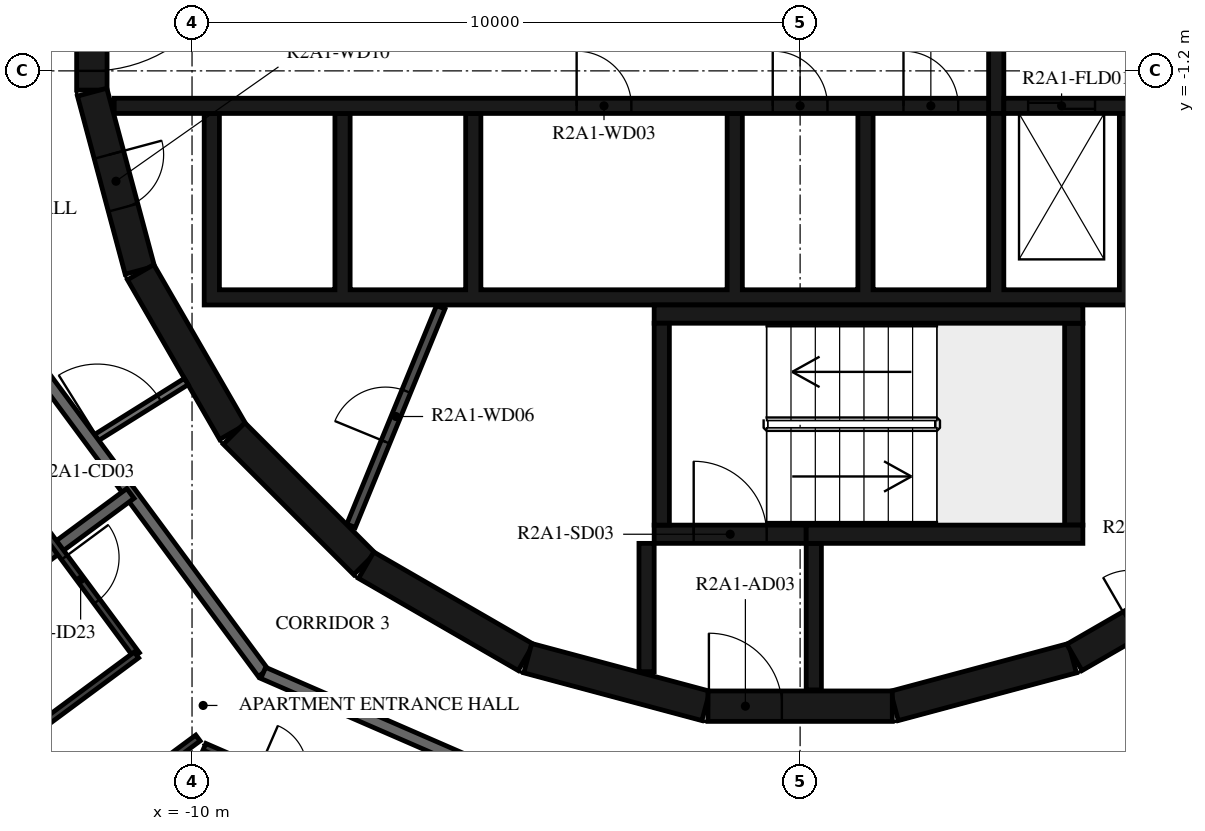
"""IFC4 building model, lengths in metres.
Left out: names, types, materials, properties, quantities, classifications, styles, units other than length and angle.
Written with IfcOpenShell. Run it as: python <this file> out.ifc"""

import sys

from ifc_helpers import new_model, si_unit, direction, frame, frame_2d, origin, place, context, subcontext, project, spatial, polyline, rectangle, outline, extrude, element, fill, save


model = new_model("IFC4")
c1 = context("Model", 3, precision=1e-05, world=origin(), true_north=direction((0.0, 1.0)))
c2 = subcontext(c1, "Body", "Model", "MODEL_VIEW")
j1 = project(units=[si_unit("LENGTHUNIT", "METRE"), si_unit("PLANEANGLEUNIT", "RADIAN")], contexts=[c1])
p1 = place(None, origin())
s1 = spatial("IfcSite", under=j1, at=p1, CompositionType="ELEMENT")
p2 = place(p1, origin())
s2 = spatial("IfcBuilding", under=s1, at=p2, CompositionType="ELEMENT")
p3 = place(p2, frame((0.0, 0.0, 80.2)))
s3 = spatial("IfcBuildingStorey", under=s2, at=p3, CompositionType="ELEMENT", Elevation=80.2)
p4 = place(p3, frame((1.55, -11.643, 0.0), z_axis=(0.0, 0.0, 1.0), x_axis=(0.965948410781, 0.258734743916, 0.0)))
e1 = element("IfcWall", 1, at=p4, inside=s3, PredefinedType="SHEAR", context=c2, shape_type="SweptSolid", body=[
    extrude(rectangle(XDim=3.033, YDim=0.5, at=frame_2d((1.516, 0.0))), origin(), (0.0, 0.0, 1.0), 3.12),
])
p5 = place(p3, frame((4.51, -10.845, 0.0), z_axis=(0.0, 0.0, 1.0), x_axis=(0.865975092491, 0.500087131594, 0.0)))
e2 = element("IfcWall", 2, at=p5, inside=s3, PredefinedType="SHEAR", context=c2, shape_type="SweptSolid", body=[
    extrude(rectangle(XDim=3.033, YDim=0.5, at=frame_2d((1.516, 0.0))), origin(), (0.0, 0.0, 1.0), 3.12),
])
p6 = place(p5, frame((1.066, 0.0, 0.0)))
e3 = element("IfcOpeningElement", 3, at=p6, cuts=e2, PredefinedType="OPENING", context=c2, shape_type="SweptSolid", body=[
    extrude(rectangle(XDim=0.9, YDim=2.1, at=frame_2d((0.45, 1.05))), frame((0.0, 0.26, 0.0), z_axis=(0.0, -1.0, 0.0), x_axis=(1.0, 0.0, 0.0)), (0.0, 0.0, 1.0), 0.52),
])
p7 = place(p3, frame((-11.647, 1.516, 0.0), z_axis=(0.0, 0.0, 1.0), x_axis=(0.0, -1.0, 0.0)))
e4 = element("IfcWall", 4, at=p7, inside=s3, PredefinedType="SHEAR", context=c2, shape_type="SweptSolid", body=[
    extrude(rectangle(XDim=3.033, YDim=0.5, at=frame_2d((1.516, 0.0))), origin(), (0.0, 0.0, 1.0), 3.12),
])
p8 = place(p7, frame((0.316, 0.0, 0.0)))
e5 = element("IfcOpeningElement", 5, at=p8, cuts=e4, PredefinedType="OPENING", context=c2, shape_type="SweptSolid", body=[
    extrude(rectangle(XDim=2.4, YDim=2.1, at=frame_2d((1.2, 1.05))), frame((0.0, 0.26, 0.0), z_axis=(0.0, -1.0, 0.0), x_axis=(1.0, 0.0, 0.0)), (0.0, 0.0, 1.0), 0.52),
])
p9 = place(p3, frame((-11.643, -1.55, 0.0), z_axis=(0.0, 0.0, 1.0), x_axis=(0.258734743916, -0.965948410781, 0.0)))
e6 = element("IfcWall", 6, at=p9, inside=s3, PredefinedType="SHEAR", context=c2, shape_type="SweptSolid", body=[
    extrude(rectangle(XDim=3.033, YDim=0.5, at=frame_2d((1.516, 0.0))), origin(), (0.0, 0.0, 1.0), 3.12),
])
p10 = place(p9, frame((1.066, 0.0, 0.0)))
e7 = element("IfcOpeningElement", 7, at=p10, cuts=e6, PredefinedType="OPENING", context=c2, shape_type="SweptSolid", body=[
    extrude(rectangle(XDim=0.9, YDim=2.1, at=frame_2d((0.45, 1.05))), frame((0.0, 0.26, 0.0), z_axis=(0.0, -1.0, 0.0), x_axis=(1.0, 0.0, 0.0)), (0.0, 0.0, 1.0), 0.52),
])
p11 = place(p3, frame((-10.845, -4.51, 0.0), z_axis=(0.0, 0.0, 1.0), x_axis=(0.500087131594, -0.865975092491, 0.0)))
e8 = element("IfcWall", 8, at=p11, inside=s3, PredefinedType="SHEAR", context=c2, shape_type="SweptSolid", body=[
    extrude(rectangle(XDim=3.033, YDim=0.5, at=frame_2d((1.516, 0.0))), origin(), (0.0, 0.0, 1.0), 3.12),
])
p12 = place(p3, frame((-9.308, -7.164, 0.0), z_axis=(0.0, 0.0, 1.0), x_axis=(0.707106781187, -0.707106781187, 0.0)))
e9 = element("IfcWall", 9, at=p12, inside=s3, PredefinedType="SHEAR", context=c2, shape_type="SweptSolid", body=[
    extrude(rectangle(XDim=3.032, YDim=0.5, at=frame_2d((1.516, 0.0))), origin(), (0.0, 0.0, 1.0), 3.12),
])
for number, where, z_axis, x_axis in (
    (10, (-7.137, -9.329, 0.0), (0.0, 0.0, 1.0), (0.866, -0.5, 0.0)),
    (11, (-4.479, -10.858, 0.0), (0.0, 0.0, 1.0), (0.966, -0.259, 0.0)),
):
    element("IfcWall", number, at=place(p3, frame(where, z_axis=z_axis, x_axis=x_axis)), inside=s3, PredefinedType="SHEAR", context=c2, shape_type="SweptSolid", body=[
        extrude(rectangle(XDim=3.033, YDim=0.5, at=frame_2d((1.516, 0.0))), origin(), (0.0, 0.0, 1.0), 3.12),
    ])
p13 = place(p3, frame((-1.516, -11.647, 0.0), z_axis=(0.0, 0.0, 1.0), x_axis=(1.0, 0.0, 0.0)))
e12 = element("IfcWall", 12, at=p13, inside=s3, PredefinedType="SHEAR", context=c2, shape_type="SweptSolid", body=[
    extrude(rectangle(XDim=3.033, YDim=0.5, at=frame_2d((1.516, 0.0))), origin(), (0.0, 0.0, 1.0), 3.12),
])
p14 = place(p13, frame((0.016, 0.0, 0.0)))
e13 = element("IfcOpeningElement", 13, at=p14, cuts=e12, PredefinedType="OPENING", context=c2, shape_type="SweptSolid", body=[
    extrude(rectangle(XDim=1.2, YDim=2.1, at=frame_2d((0.6, 1.05))), frame((0.0, 0.26, 0.0), z_axis=(0.0, -1.0, 0.0), x_axis=(1.0, 0.0, 0.0)), (0.0, 0.0, 1.0), 0.52),
])
p15 = place(p3, frame((-2.275, -8.67, 0.0), z_axis=(0.0, 0.0, 1.0), x_axis=(0.0, 1.0, 0.0)))
e14 = element("IfcWall", 14, at=p15, inside=s3, PredefinedType="SHEAR", context=c2, shape_type="SweptSolid", body=[
    extrude(rectangle(XDim=3.32, YDim=0.25, at=frame_2d((1.66, 0.0))), origin(), (0.0, 0.0, 1.0), 3.12),
])
p16 = place(p3, frame((-2.4, -5.2, 0.0), z_axis=(0.0, 0.0, 1.0), x_axis=(1.0, 0.0, 0.0)))
e15 = element("IfcWall", 15, at=p16, inside=s3, PredefinedType="SHEAR", context=c2, shape_type="SweptSolid", body=[
    extrude(rectangle(XDim=7.05, YDim=0.3, at=frame_2d((3.525, 0.0))), origin(), (0.0, 0.0, 1.0), 3.12),
])
p17 = place(p3, frame((4.5, -8.67, 0.0), z_axis=(0.0, 0.0, 1.0), x_axis=(0.0, 1.0, 0.0)))
e16 = element("IfcWall", 16, at=p17, inside=s3, PredefinedType="SHEAR", context=c2, shape_type="SweptSolid", body=[
    extrude(rectangle(XDim=3.32, YDim=0.3, at=frame_2d((1.66, 0.0))), origin(), (0.0, 0.0, 1.0), 3.12),
])
p18 = place(p3, frame((0.1, -8.82, 0.0), z_axis=(0.0, 0.0, 1.0), x_axis=(1.0, 0.0, 0.0)))
e17 = element("IfcWall", 17, at=p18, inside=s3, PredefinedType="SHEAR", context=c2, shape_type="SweptSolid", body=[
    extrude(rectangle(XDim=4.55, YDim=0.3, at=frame_2d((2.275, 0.0))), origin(), (0.0, 0.0, 1.0), 3.12),
])
p19 = place(p3, frame((-2.4, -8.82, 0.0), z_axis=(0.0, 0.0, 1.0), x_axis=(1.0, 0.0, 0.0)))
e18 = element("IfcWall", 18, at=p19, inside=s3, PredefinedType="SHEAR", context=c2, shape_type="SweptSolid", body=[
    extrude(rectangle(XDim=2.5, YDim=0.3, at=frame_2d((1.25, 0.0))), origin(), (0.0, 0.0, 1.0), 3.12),
])
p20 = place(p19, frame((0.65, 0.0, 0.0)))
e19 = element("IfcOpeningElement", 19, at=p20, cuts=e18, PredefinedType="OPENING", context=c2, shape_type="SweptSolid", body=[
    extrude(rectangle(XDim=1.2, YDim=2.1, at=frame_2d((0.6, 1.05))), frame((0.0, 0.16, 0.0), z_axis=(0.0, -1.0, 0.0), x_axis=(1.0, 0.0, 0.0)), (0.0, 0.0, 1.0), 0.32),
])
p21 = place(p3, frame((-2.525, -8.97, 0.0), z_axis=(0.0, 0.0, 1.0), x_axis=(0.0, -1.0, 0.0)))
e20 = element("IfcWall", 20, at=p21, inside=s3, PredefinedType="SHEAR", context=c2, shape_type="SweptSolid", body=[
    extrude(rectangle(XDim=2.11, YDim=0.25, at=frame_2d((1.055, 0.0))), origin(), (0.0, 0.0, 1.0), 3.12),
])
p22 = place(p3, frame((0.225, -8.97, 0.0), z_axis=(0.0, 0.0, 1.0), x_axis=(0.0, -1.0, 0.0)))
e21 = element("IfcWall", 21, at=p22, inside=s3, PredefinedType="SHEAR", context=c2, shape_type="SweptSolid", body=[
    extrude(rectangle(XDim=2.41, YDim=0.25, at=frame_2d((1.205, 0.0))), origin(), (0.0, 0.0, 1.0), 3.12),
])
p23 = place(p3, origin())
e22 = element("IfcWall", 22, at=p23, inside=s3, PredefinedType="SHEAR", context=c2, shape_type="SweptSolid", body=[
    extrude(outline(polyline([(9.8, -5.05), (9.8, -4.8), (9.8, -1.9), (9.55, -1.9), (9.55, -4.8), (7.65, -4.8), (7.65, -1.9), (7.4, -1.9), (7.4, -4.8), (5.5, -4.8), (5.5, -1.9), (5.25, -1.9), (5.25, -4.8), (3.35, -4.8), (3.35, -1.9), (3.1, -1.9), (3.1, -4.8), (1.2, -4.8), (1.2, -1.9), (0.95, -1.9), (0.95, -4.8), (-0.95, -4.8), (-0.95, -1.9), (-1.2, -1.9), (-1.2, -4.8), (-5.25, -4.8), (-5.25, -1.9), (-5.5, -1.9), (-5.5, -4.8), (-7.4, -4.8), (-7.4, -1.9), (-7.65, -1.9), (-7.65, -4.8), (-9.55, -4.8), (-9.55, -1.9), (-9.8, -1.9), (-9.8, -4.8), (-9.8, -5.05), (9.8, -5.05)])), origin(), (0.0, 0.0, 1.0), 3.12),
])
p24 = place(p3, frame((-11.28, -1.775, 0.0), z_axis=(0.0, 0.0, 1.0), x_axis=(1.0, 0.0, 0.0)))
e23 = element("IfcWall", 23, at=p24, inside=s3, PredefinedType="SHEAR", context=c2, shape_type="SweptSolid", body=[
    extrude(rectangle(XDim=14.38, YDim=0.25, at=frame_2d((7.19, 0.0))), origin(), (0.0, 0.0, 1.0), 3.12),
])
p25 = place(p24, frame((7.605, 0.0, 0.0)))
e24 = element("IfcOpeningElement", 24, at=p25, cuts=e23, PredefinedType="OPENING", context=c2, shape_type="SweptSolid", body=[
    extrude(rectangle(XDim=0.9, YDim=2.1, at=frame_2d((0.45, 1.05))), frame((0.0, 0.135, 0.0), z_axis=(0.0, -1.0, 0.0), x_axis=(1.0, 0.0, 0.0)), (0.0, 0.0, 1.0), 0.27),
])
p26 = place(p24, frame((10.83, 0.0, 0.0)))
e25 = element("IfcOpeningElement", 25, at=p26, cuts=e23, PredefinedType="OPENING", context=c2, shape_type="SweptSolid", body=[
    extrude(rectangle(XDim=0.9, YDim=2.1, at=frame_2d((0.45, 1.05))), frame((0.0, 0.135, 0.0), z_axis=(0.0, -1.0, 0.0), x_axis=(1.0, 0.0, 0.0)), (0.0, 0.0, 1.0), 0.27),
])
p27 = place(p24, frame((12.98, 0.0, 0.0)))
e26 = element("IfcOpeningElement", 26, at=p27, cuts=e23, PredefinedType="OPENING", context=c2, shape_type="SweptSolid", body=[
    extrude(rectangle(XDim=0.9, YDim=2.1, at=frame_2d((0.45, 1.05))), frame((0.0, 0.135, 0.0), z_axis=(0.0, -1.0, 0.0), x_axis=(1.0, 0.0, 0.0)), (0.0, 0.0, 1.0), 0.27),
])
p28 = place(p3, frame((3.35, -1.775, 0.0), z_axis=(0.0, 0.0, 1.0), x_axis=(1.0, 0.0, 0.0)))
e27 = element("IfcWall", 27, at=p28, inside=s3, PredefinedType="SHEAR", context=c2, shape_type="SweptSolid", body=[
    extrude(rectangle(XDim=7.93, YDim=0.25, at=frame_2d((3.965, 0.0))), origin(), (0.0, 0.0, 1.0), 3.12),
])
p29 = place(p28, frame((0.4, 0.0, 0.0)))
e28 = element("IfcOpeningElement", 28, at=p29, cuts=e27, PredefinedType="OPENING", context=c2, shape_type="SweptSolid", body=[
    extrude(rectangle(XDim=1.1, YDim=2.4, at=frame_2d((0.55, 1.2))), frame((0.0, 0.135, 0.0), z_axis=(0.0, -1.0, 0.0), x_axis=(1.0, 0.0, 0.0)), (0.0, 0.0, 1.0), 0.27),
])
p30 = place(p28, frame((2.55, 0.0, 0.0)))
e29 = element("IfcOpeningElement", 29, at=p30, cuts=e27, PredefinedType="OPENING", context=c2, shape_type="SweptSolid", body=[
    extrude(rectangle(XDim=1.1, YDim=2.4, at=frame_2d((0.55, 1.2))), frame((0.0, 0.135, 0.0), z_axis=(0.0, -1.0, 0.0), x_axis=(1.0, 0.0, 0.0)), (0.0, 0.0, 1.0), 0.27),
])
p31 = place(p28, frame((4.7, 0.0, 0.0)))
e30 = element("IfcOpeningElement", 30, at=p31, cuts=e27, PredefinedType="OPENING", context=c2, shape_type="SweptSolid", body=[
    extrude(rectangle(XDim=1.1, YDim=2.4, at=frame_2d((0.55, 1.2))), frame((0.0, 0.135, 0.0), z_axis=(0.0, -1.0, 0.0), x_axis=(1.0, 0.0, 0.0)), (0.0, 0.0, 1.0), 0.27),
])
p32 = place(p3, frame((3.225, -1.9, 0.0), z_axis=(0.0, 0.0, 1.0), x_axis=(0.0, 1.0, 0.0)))
e31 = element("IfcWall", 31, at=p32, inside=s3, PredefinedType="SHEAR", context=c2, shape_type="SweptSolid", body=[
    extrude(rectangle(XDim=3.8, YDim=0.25, at=frame_2d((1.9, 0.0))), origin(), (0.0, 0.0, 1.0), 3.12),
])
p33 = place(p3, frame((-7.385, -8.681, 0.0), z_axis=(0.0, 0.0, 1.0), x_axis=(0.379804590409, 0.925066739811, 0.0)))
e32 = element("IfcWall", 32, at=p33, inside=s3, PredefinedType="PARTITIONING", context=c2, shape_type="SweptSolid", body=[
    extrude(rectangle(XDim=3.885, YDim=0.15, at=frame_2d((1.942, 0.0))), origin(), (0.0, 0.0, 1.0), 3.12),
])
p34 = place(p33, frame((1.493, 0.0, 0.0)))
e33 = element("IfcOpeningElement", 33, at=p34, cuts=e32, PredefinedType="OPENING", context=c2, shape_type="SweptSolid", body=[
    extrude(rectangle(XDim=0.9, YDim=2.1, at=frame_2d((0.45, 1.05))), frame((0.0, 0.085, 0.0), z_axis=(0.0, -1.0, 0.0), x_axis=(1.0, 0.0, 0.0)), (0.0, 0.0, 1.0), 0.17),
])
p35 = place(p3, frame((-11.654, -7.282, 0.0), z_axis=(0.0, 0.0, 1.0), x_axis=(0.848117698675, 0.529807860638, 0.0)))
e34 = element("IfcWall", 34, at=p35, inside=s3, PredefinedType="PARTITIONING", context=c2, shape_type="SweptSolid", body=[
    extrude(rectangle(XDim=1.838, YDim=0.12, at=frame_2d((0.919, 0.0))), origin(), (0.0, 0.0, 1.0), 3.12),
])
p36 = place(p35, frame((0.115, 0.0, 0.0)))
e35 = element("IfcOpeningElement", 35, at=p36, cuts=e34, PredefinedType="OPENING", context=c2, shape_type="SweptSolid", body=[
    extrude(rectangle(XDim=1.2, YDim=2.1, at=frame_2d((0.6, 1.05))), frame((0.0, 0.07, 0.0), z_axis=(0.0, -1.0, 0.0), x_axis=(1.0, 0.0, 0.0)), (0.0, 0.0, 1.0), 0.14),
])
p37 = place(p3, frame((-13.196, -5.198, 0.0), z_axis=(0.0, 0.0, 1.0), x_axis=(0.594805187394, -0.803869883159, 0.0)))
e36 = element("IfcWall", 36, at=p37, inside=s3, PredefinedType="STANDARD", context=c2, shape_type="SweptSolid", body=[
    extrude(rectangle(XDim=7.342, YDim=0.2, at=frame_2d((3.671, 0.0))), origin(), (0.0, 0.0, 1.0), 3.12),
])
p38 = place(p3, frame((-8.829, -11.1, 0.0), z_axis=(0.0, 0.0, 1.0), x_axis=(0.917063622491, -0.398740908742, 0.0)))
e37 = element("IfcWall", 37, at=p38, inside=s3, PredefinedType="STANDARD", context=c2, shape_type="SweptSolid", body=[
    extrude(rectangle(XDim=7.24, YDim=0.2, at=frame_2d((3.62, 0.0))), origin(), (0.0, 0.0, 1.0), 3.12),
])
p39 = place(p38, frame((6.04, 0.0, 0.0)))
e38 = element("IfcOpeningElement", 38, at=p39, cuts=e37, PredefinedType="OPENING", context=c2, shape_type="SweptSolid", body=[
    extrude(rectangle(XDim=1.0, YDim=2.1, at=frame_2d((0.5, 1.05))), frame((0.0, 0.11, 0.0), z_axis=(0.0, -1.0, 0.0), x_axis=(1.0, 0.0, 0.0)), (0.0, 0.0, 1.0), 0.22),
])
p40 = place(p3, frame((5.198, -13.196, 0.0), z_axis=(0.0, 0.0, 1.0), x_axis=(0.803869883159, 0.594805187394, 0.0)))
e39 = element("IfcWall", 39, at=p40, inside=s3, PredefinedType="STANDARD", context=c2, shape_type="SweptSolid", body=[
    extrude(rectangle(XDim=7.342, YDim=0.2, at=frame_2d((3.671, 0.0))), origin(), (0.0, 0.0, 1.0), 3.12),
])
p41 = place(p3, frame((-15.41, -11.403, 0.0), z_axis=(0.0, 0.0, 1.0), x_axis=(0.803887568227, 0.594781285558, 0.0)))
e40 = element("IfcWall", 40, at=p41, inside=s3, PredefinedType="STANDARD", context=c2, shape_type="SweptSolid", body=[
    extrude(rectangle(XDim=5.47, YDim=0.2, at=frame_2d((2.735, 0.0))), origin(), (0.0, 0.0, 1.0), 3.12),
])
p42 = place(p3, frame((-14.641, -5.767, 0.0), z_axis=(0.0, 0.0, 1.0), x_axis=(0.594825885962, -0.803854567313, 0.0)))
e41 = element("IfcWall", 41, at=p42, inside=s3, PredefinedType="PARTITIONING", context=c2, shape_type="SweptSolid", body=[
    extrude(rectangle(XDim=6.266, YDim=0.12, at=frame_2d((3.133, 0.0))), origin(), (0.0, 0.0, 1.0), 3.12),
])
p43 = place(p42, frame((4.273, 0.0, 0.0)))
e42 = element("IfcOpeningElement", 42, at=p43, cuts=e41, PredefinedType="OPENING", context=c2, shape_type="SweptSolid", body=[
    extrude(rectangle(XDim=0.9, YDim=2.1, at=frame_2d((0.45, 1.05))), frame((0.0, 0.07, 0.0), z_axis=(0.0, -1.0, 0.0), x_axis=(1.0, 0.0, 0.0)), (0.0, 0.0, 1.0), 0.14),
])
p44 = place(p3, frame((-10.914, -10.804, 0.0), z_axis=(0.0, 0.0, 1.0), x_axis=(-0.803864616889, -0.594812304609, 0.0)))
e43 = element("IfcWall", 43, at=p44, inside=s3, PredefinedType="PARTITIONING", context=c2, shape_type="SweptSolid", body=[
    extrude(rectangle(XDim=4.008, YDim=0.12, at=frame_2d((2.004, 0.0))), origin(), (0.0, 0.0, 1.0), 3.12),
])
p45 = place(p3, frame((-13.125, -14.555, 0.0), z_axis=(0.0, 0.0, 1.0), x_axis=(0.80389374229, 0.594772940799, 0.0)))
e44 = element("IfcWall", 44, at=p45, inside=s3, PredefinedType="PARTITIONING", context=c2, shape_type="SweptSolid", body=[
    extrude(rectangle(XDim=4.008, YDim=0.12, at=frame_2d((2.004, 0.0))), origin(), (0.0, 0.0, 1.0), 3.12),
])
p46 = place(p3, frame((-9.796, -12.315, 0.0), z_axis=(0.0, 0.0, 1.0), x_axis=(0.917059572812, -0.398750222463, 0.0)))
e45 = element("IfcWall", 45, at=p46, inside=s3, PredefinedType="PARTITIONING", context=c2, shape_type="SweptSolid", body=[
    extrude(rectangle(XDim=8.146, YDim=0.12, at=frame_2d((4.073, 0.0))), origin(), (0.0, 0.0, 1.0), 3.12),
])
p47 = place(p46, frame((0.969, 0.0, 0.0)))
e46 = element("IfcOpeningElement", 46, at=p47, cuts=e45, PredefinedType="OPENING", context=c2, shape_type="SweptSolid", body=[
    extrude(rectangle(XDim=0.8, YDim=2.1, at=frame_2d((0.4, 1.05))), frame((0.0, 0.07, 0.0), z_axis=(0.0, -1.0, 0.0), x_axis=(1.0, 0.0, 0.0)), (0.0, 0.0, 1.0), 0.14),
])
p48 = place(p20, origin())
e47 = element("IfcDoor", 47, at=p48, inside=s3, OperationType="SINGLE_SWING_LEFT", PredefinedType="DOOR", context=c2, shape_type="SweptSolid", body=[
    extrude(rectangle(XDim=1.2, YDim=2.1, at=frame_2d((0.6, 1.05))), frame((0.0, 0.025, 0.0), z_axis=(0.0, -1.0, 0.0), x_axis=(1.0, 0.0, 0.0)), (0.0, 0.0, 1.0), 0.05),
])
fill(e19, e47)
p49 = place(p14, origin())
e48 = element("IfcDoor", 48, at=p49, inside=s3, OperationType="SINGLE_SWING_RIGHT", PredefinedType="DOOR", context=c2, shape_type="SweptSolid", body=[
    extrude(rectangle(XDim=1.2, YDim=2.1, at=frame_2d((0.6, 1.05))), frame((0.0, 0.025, 0.0), z_axis=(0.0, -1.0, 0.0), x_axis=(1.0, 0.0, 0.0)), (0.0, 0.0, 1.0), 0.05),
])
fill(e13, e48)
p50 = place(p8, origin())
e49 = element("IfcDoor", 49, at=p50, inside=s3, OperationType="DOUBLE_DOOR_SINGLE_SWING", PredefinedType="DOOR", context=c2, shape_type="SweptSolid", body=[
    extrude(rectangle(XDim=2.4, YDim=2.1, at=frame_2d((1.2, 1.05))), frame((0.0, 0.025, 0.0), z_axis=(0.0, -1.0, 0.0), x_axis=(1.0, 0.0, 0.0)), (0.0, 0.0, 1.0), 0.05),
])
fill(e5, e49)
p51 = place(p29, origin())
e50 = element("IfcDoor", 50, at=p51, inside=s3, OperationType="DOUBLE_DOOR_SLIDING", PredefinedType="DOOR", context=c2, shape_type="SweptSolid", body=[
    extrude(rectangle(XDim=1.1, YDim=2.4, at=frame_2d((0.55, 1.2))), frame((0.0, 0.025, 0.0), z_axis=(0.0, -1.0, 0.0), x_axis=(1.0, 0.0, 0.0)), (0.0, 0.0, 1.0), 0.05),
])
fill(e28, e50)
p52 = place(p25, origin())
e51 = element("IfcDoor", 51, at=p52, inside=s3, OperationType="SINGLE_SWING_RIGHT", PredefinedType="DOOR", context=c2, shape_type="SweptSolid", body=[
    extrude(rectangle(XDim=0.9, YDim=2.1, at=frame_2d((0.45, 1.05))), frame((0.0, 0.025, 0.0), z_axis=(0.0, -1.0, 0.0), x_axis=(1.0, 0.0, 0.0)), (0.0, 0.0, 1.0), 0.05),
])
fill(e24, e51)
p53 = place(p26, origin())
e52 = element("IfcDoor", 52, at=p53, inside=s3, OperationType="SINGLE_SWING_LEFT", PredefinedType="DOOR", context=c2, shape_type="SweptSolid", body=[
    extrude(rectangle(XDim=0.9, YDim=2.1, at=frame_2d((0.45, 1.05))), frame((0.0, 0.025, 0.0), z_axis=(0.0, -1.0, 0.0), x_axis=(1.0, 0.0, 0.0)), (0.0, 0.0, 1.0), 0.05),
])
fill(e25, e52)
p54 = place(p27, origin())
e53 = element("IfcDoor", 53, at=p54, inside=s3, OperationType="SINGLE_SWING_RIGHT", PredefinedType="DOOR", context=c2, shape_type="SweptSolid", body=[
    extrude(rectangle(XDim=0.9, YDim=2.1, at=frame_2d((0.45, 1.05))), frame((0.0, 0.025, 0.0), z_axis=(0.0, -1.0, 0.0), x_axis=(1.0, 0.0, 0.0)), (0.0, 0.0, 1.0), 0.05),
])
fill(e26, e53)
p55 = place(p34, origin())
e54 = element("IfcDoor", 54, at=p55, inside=s3, OperationType="SINGLE_SWING_LEFT", PredefinedType="DOOR", context=c2, shape_type="SweptSolid", body=[
    extrude(rectangle(XDim=0.9, YDim=2.1, at=frame_2d((0.45, 1.05))), frame((0.0, 0.025, 0.0), z_axis=(0.0, -1.0, 0.0), x_axis=(1.0, 0.0, 0.0)), (0.0, 0.0, 1.0), 0.05),
])
fill(e33, e54)
p56 = place(p10, origin())
e55 = element("IfcDoor", 55, at=p56, inside=s3, OperationType="SINGLE_SWING_LEFT", PredefinedType="DOOR", context=c2, shape_type="SweptSolid", body=[
    extrude(rectangle(XDim=0.9, YDim=2.1, at=frame_2d((0.45, 1.05))), frame((0.0, 0.025, 0.0), z_axis=(0.0, -1.0, 0.0), x_axis=(1.0, 0.0, 0.0)), (0.0, 0.0, 1.0), 0.05),
])
fill(e7, e55)
p57 = place(p43, origin())
e56 = element("IfcDoor", 56, at=p57, inside=s3, OperationType="SINGLE_SWING_LEFT", PredefinedType="DOOR", context=c2, shape_type="SweptSolid", body=[
    extrude(rectangle(XDim=0.9, YDim=2.1, at=frame_2d((0.45, 1.05))), frame((0.0, 0.025, 0.0), z_axis=(0.0, -1.0, 0.0), x_axis=(1.0, 0.0, 0.0)), (0.0, 0.0, 1.0), 0.05),
])
fill(e42, e56)
p58 = place(p36, origin())
e57 = element("IfcDoor", 57, at=p58, inside=s3, OperationType="DOUBLE_DOOR_SINGLE_SWING", PredefinedType="DOOR", context=c2, shape_type="SweptSolid", body=[
    extrude(rectangle(XDim=1.2, YDim=2.1, at=frame_2d((0.6, 1.05))), frame((0.0, 0.025, 0.0), z_axis=(0.0, -1.0, 0.0), x_axis=(1.0, 0.0, 0.0)), (0.0, 0.0, 1.0), 0.05),
])
fill(e35, e57)
save(model, sys.argv[1])
